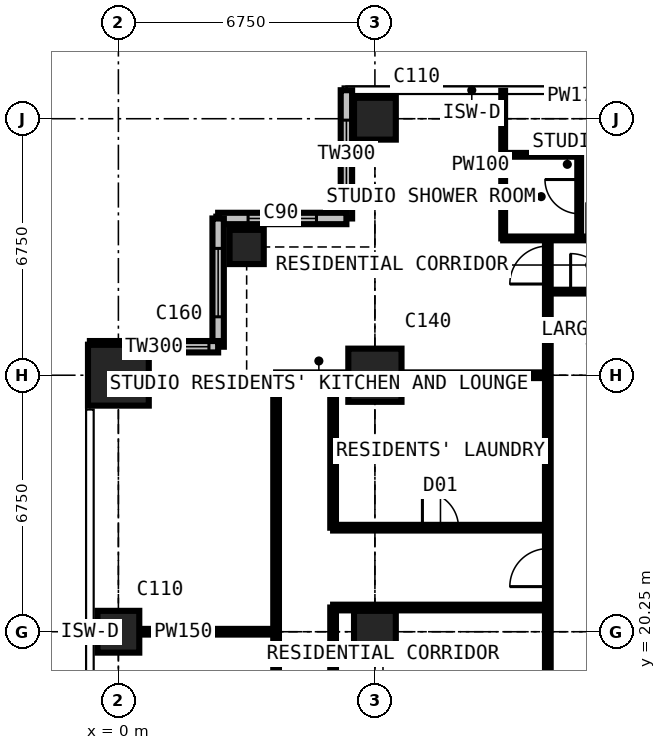
"""IFC4 building model, lengths in metres.
Left out: names, types, materials, properties, quantities, classifications, styles, units other than length and angle.
Written with IfcOpenShell. Run it as: python <this file> out.ifc"""

import sys

from ifc_helpers import new_model, si_unit, direction, frame, frame_2d, origin, origin_2d, place, context, subcontext, project, spatial, rectangle, extrude, element, fill, save


model = new_model("IFC4")
c1 = context("Model", 3, precision=1e-05, world=origin(), true_north=direction((0.0, 1.0)))
c2 = subcontext(c1, "Body", "Model", "MODEL_VIEW")
j1 = project(units=[si_unit("LENGTHUNIT", "METRE"), si_unit("PLANEANGLEUNIT", "RADIAN")], contexts=[c1])
p1 = place(None, origin())
s1 = spatial("IfcSite", under=j1, at=p1, CompositionType="ELEMENT")
p2 = place(p1, origin())
s2 = spatial("IfcBuilding", under=s1, at=p2, CompositionType="ELEMENT")
p3 = place(p2, frame((0.0, 0.0, 204.3)))
s3 = spatial("IfcBuildingStorey", under=s2, at=p3, CompositionType="ELEMENT", Elevation=204.3)
p4 = place(p3, frame((0.0, 20.25, 0.0), z_axis=(0.0, 0.0, 1.0), x_axis=(1.0, 0.0, 0.0)))
e1 = element("IfcColumn", 1, at=p4, inside=s3, PredefinedType="COLUMN", context=c2, shape_type="SweptSolid", body=[
    extrude(rectangle(XDim=1.1, YDim=1.1, at=origin_2d()), origin(), (0.0, 0.0, 1.0), 3.6),
])
p5 = place(p3, frame((0.0, 27.0, 0.0), z_axis=(0.0, 0.0, 1.0), x_axis=(1.0, 0.0, 0.0)))
e2 = element("IfcColumn", 2, at=p5, inside=s3, PredefinedType="COLUMN", context=c2, shape_type="SweptSolid", body=[
    extrude(rectangle(XDim=1.6, YDim=1.6, at=origin_2d()), origin(), (0.0, 0.0, 1.0), 3.6),
])
p6 = place(p3, frame((3.375, 30.375, 0.0), z_axis=(0.0, 0.0, 1.0), x_axis=(1.0, 0.0, 0.0)))
e3 = element("IfcColumn", 3, at=p6, inside=s3, PredefinedType="COLUMN", context=c2, shape_type="SweptSolid", body=[
    extrude(rectangle(XDim=0.9, YDim=0.9, at=origin_2d()), origin(), (0.0, 0.0, 1.0), 3.6),
])
p7 = place(p3, frame((6.75, 20.25, 0.0), z_axis=(0.0, 0.0, 1.0), x_axis=(1.0, 0.0, 0.0)))
e4 = element("IfcColumn", 4, at=p7, inside=s3, PredefinedType="COLUMN", context=c2, shape_type="SweptSolid", body=[
    extrude(rectangle(XDim=1.1, YDim=1.1, at=origin_2d()), origin(), (0.0, 0.0, 1.0), 3.6),
])
p8 = place(p3, frame((6.75, 27.0, 0.0), z_axis=(0.0, 0.0, 1.0), x_axis=(1.0, 0.0, 0.0)))
e5 = element("IfcColumn", 5, at=p8, inside=s3, PredefinedType="COLUMN", context=c2, shape_type="SweptSolid", body=[
    extrude(rectangle(XDim=1.4, YDim=1.4, at=origin_2d()), origin(), (0.0, 0.0, 1.0), 3.6),
])
p9 = place(p3, frame((6.75, 33.75, 0.0), z_axis=(0.0, 0.0, 1.0), x_axis=(1.0, 0.0, 0.0)))
e6 = element("IfcColumn", 6, at=p9, inside=s3, PredefinedType="COLUMN", context=c2, shape_type="SweptSolid", body=[
    extrude(rectangle(XDim=1.1, YDim=1.1, at=origin_2d()), origin(), (0.0, 0.0, 1.0), 3.6),
])
p10 = place(p3, frame((6.0, 34.5, 0.0), z_axis=(0.0, 0.0, 1.0), x_axis=(0.0, -1.0, 0.0)))
e7 = element("IfcWall", 7, at=p10, inside=s3, PredefinedType="SOLIDWALL", context=c2, shape_type="SweptSolid", body=[
    extrude(rectangle(XDim=3.375, YDim=0.3, at=frame_2d((1.688, 0.0))), origin(), (0.0, 0.0, 1.0), 3.375),
])
p11 = place(p10, frame((0.788, 0.0, 0.6)))
e8 = element("IfcOpeningElement", 8, at=p11, cuts=e7, PredefinedType="OPENING", context=c2, shape_type="SweptSolid", body=[
    extrude(rectangle(XDim=1.8, YDim=2.1, at=frame_2d((0.9, 1.05))), frame((0.0, 0.16, 0.0), z_axis=(0.0, -1.0, 0.0), x_axis=(1.0, 0.0, 0.0)), (0.0, 0.0, 1.0), 0.32),
])
p12 = place(p3, frame((6.0, 31.125, 0.0), z_axis=(0.0, 0.0, 1.0), x_axis=(-1.0, 0.0, 0.0)))
e9 = element("IfcWall", 9, at=p12, inside=s3, PredefinedType="SOLIDWALL", context=c2, shape_type="SweptSolid", body=[
    extrude(rectangle(XDim=3.375, YDim=0.3, at=frame_2d((1.688, 0.0))), origin(), (0.0, 0.0, 1.0), 3.375),
])
p13 = place(p12, frame((0.788, 0.0, 0.6)))
e10 = element("IfcOpeningElement", 10, at=p13, cuts=e9, PredefinedType="OPENING", context=c2, shape_type="SweptSolid", body=[
    extrude(rectangle(XDim=1.8, YDim=2.1, at=frame_2d((0.9, 1.05))), frame((0.0, 0.16, 0.0), z_axis=(0.0, -1.0, 0.0), x_axis=(1.0, 0.0, 0.0)), (0.0, 0.0, 1.0), 0.32),
])
p14 = place(p3, frame((2.625, 31.125, 0.0), z_axis=(0.0, 0.0, 1.0), x_axis=(0.0, -1.0, 0.0)))
e11 = element("IfcWall", 11, at=p14, inside=s3, PredefinedType="SOLIDWALL", context=c2, shape_type="SweptSolid", body=[
    extrude(rectangle(XDim=3.375, YDim=0.3, at=frame_2d((1.688, 0.0))), origin(), (0.0, 0.0, 1.0), 3.375),
])
p15 = place(p14, frame((0.788, 0.0, 0.6)))
e12 = element("IfcOpeningElement", 12, at=p15, cuts=e11, PredefinedType="OPENING", context=c2, shape_type="SweptSolid", body=[
    extrude(rectangle(XDim=1.8, YDim=2.1, at=frame_2d((0.9, 1.05))), frame((0.0, 0.16, 0.0), z_axis=(0.0, -1.0, 0.0), x_axis=(1.0, 0.0, 0.0)), (0.0, 0.0, 1.0), 0.32),
])
p16 = place(p3, frame((2.625, 27.75, 0.0), z_axis=(0.0, 0.0, 1.0), x_axis=(-1.0, 0.0, 0.0)))
e13 = element("IfcWall", 13, at=p16, inside=s3, PredefinedType="SOLIDWALL", context=c2, shape_type="SweptSolid", body=[
    extrude(rectangle(XDim=3.375, YDim=0.3, at=frame_2d((1.688, 0.0))), origin(), (0.0, 0.0, 1.0), 3.375),
])
p17 = place(p16, frame((0.242, 0.0, 0.9)))
e14 = element("IfcOpeningElement", 14, at=p17, cuts=e13, PredefinedType="OPENING", context=c2, shape_type="SweptSolid", body=[
    extrude(rectangle(XDim=1.5, YDim=1.8, at=frame_2d((0.75, 0.9))), frame((0.0, 0.16, 0.0), z_axis=(0.0, -1.0, 0.0), x_axis=(1.0, 0.0, 0.0)), (0.0, 0.0, 1.0), 0.32),
])
p18 = place(p3, frame((-0.734, 20.25, 0.0), z_axis=(0.0, 0.0, 1.0), x_axis=(1.0, 0.0, 0.0)))
e15 = element("IfcWall", 15, at=p18, inside=s3, PredefinedType="PARTITIONING", context=c2, shape_type="SweptSolid", body=[
    extrude(rectangle(XDim=4.884, YDim=0.15, at=frame_2d((2.442, 0.0))), origin(), (0.0, 0.0, 1.0), 2.877),
])
p19 = place(p3, frame((4.15, 13.5, 0.0), z_axis=(0.0, 0.0, 1.0), x_axis=(0.0, 1.0, 0.0)))
e16 = element("IfcWall", 16, at=p19, inside=s3, PredefinedType="PARTITIONING", context=c2, shape_type="SweptSolid", body=[
    extrude(rectangle(XDim=13.5, YDim=0.15, at=frame_2d((6.75, 0.0))), origin(), (0.0, 0.0, 1.0), 3.375),
])
p20 = place(p19, frame((4.2, 0.0, 0.0)))
e17 = element("IfcOpeningElement", 17, at=p20, cuts=e16, PredefinedType="OPENING", context=c2, shape_type="SweptSolid", body=[
    extrude(rectangle(XDim=0.95, YDim=2.2, at=frame_2d((0.475, 1.1))), frame((0.0, 0.085, 0.0), z_axis=(0.0, -1.0, 0.0), x_axis=(1.0, 0.0, 0.0)), (0.0, 0.0, 1.0), 0.17),
])
p21 = place(p3, frame((4.15, 27.0, 0.0), z_axis=(0.0, 0.0, 1.0), x_axis=(1.0, 0.0, 0.0)))
e18 = element("IfcWall", 18, at=p21, inside=s3, PredefinedType="PARTITIONING", context=c2, shape_type="SweptSolid", body=[
    extrude(rectangle(XDim=7.15, YDim=0.15, at=frame_2d((3.575, 0.0))), origin(), (0.0, 0.0, 1.0), 2.806),
])
p22 = place(p3, frame((5.65, 10.125, 0.0), z_axis=(0.0, 0.0, 1.0), x_axis=(0.0, 1.0, 0.0)))
e19 = element("IfcWall", 19, at=p22, inside=s3, PredefinedType="PARTITIONING", context=c2, shape_type="SweptSolid", body=[
    extrude(rectangle(XDim=10.762, YDim=0.15, at=frame_2d((5.381, 0.0))), origin(), (0.0, 0.0, 1.0), 3.375),
])
p23 = place(p22, frame((4.9, 0.0, 0.0)))
e20 = element("IfcOpeningElement", 20, at=p23, cuts=e19, PredefinedType="OPENING", context=c2, shape_type="SweptSolid", body=[
    extrude(rectangle(XDim=0.95, YDim=2.2, at=frame_2d((0.475, 1.1))), frame((0.0, 0.085, 0.0), z_axis=(0.0, -1.0, 0.0), x_axis=(1.0, 0.0, 0.0)), (0.0, 0.0, 1.0), 0.17),
])
p24 = place(p3, frame((5.65, 20.887, 0.0), z_axis=(0.0, 0.0, 1.0), x_axis=(1.0, 0.0, 0.0)))
e21 = element("IfcWall", 21, at=p24, inside=s3, PredefinedType="PARTITIONING", context=c2, shape_type="SweptSolid", body=[
    extrude(rectangle(XDim=5.65, YDim=0.15, at=frame_2d((2.825, 0.0))), origin(), (0.0, 0.0, 1.0), 3.375),
])
p25 = place(p3, frame((5.65, 22.988, 0.0), z_axis=(0.0, 0.0, 1.0), x_axis=(0.0, 1.0, 0.0)))
e22 = element("IfcWall", 22, at=p25, inside=s3, PredefinedType="PARTITIONING", context=c2, shape_type="SweptSolid", body=[
    extrude(rectangle(XDim=4.012, YDim=0.15, at=frame_2d((2.006, 0.0))), origin(), (0.0, 0.0, 1.0), 3.375),
])
p26 = place(p3, frame((5.65, 22.988, 0.0), z_axis=(0.0, 0.0, 1.0), x_axis=(1.0, 0.0, 0.0)))
e23 = element("IfcWall", 23, at=p26, inside=s3, PredefinedType="PARTITIONING", context=c2, shape_type="SweptSolid", body=[
    extrude(rectangle(XDim=5.65, YDim=0.15, at=frame_2d((2.825, 0.0))), origin(), (0.0, 0.0, 1.0), 3.375),
])
p27 = place(p26, frame((2.35, 0.0, 0.0)))
e24 = element("IfcOpeningElement", 24, at=p27, cuts=e23, PredefinedType="OPENING", context=c2, shape_type="SweptSolid", body=[
    extrude(rectangle(XDim=0.95, YDim=2.2, at=frame_2d((0.475, 1.1))), frame((0.0, 0.085, 0.0), z_axis=(0.0, -1.0, 0.0), x_axis=(1.0, 0.0, 0.0)), (0.0, 0.0, 1.0), 0.17),
])
p28 = place(p3, frame((10.125, 30.6, 0.0), z_axis=(0.0, 0.0, 1.0), x_axis=(0.0, 1.0, 0.0)))
e25 = element("IfcWall", 25, at=p28, inside=s3, PredefinedType="PARTITIONING", context=c2, shape_type="SweptSolid", body=[
    extrude(rectangle(XDim=3.884, YDim=0.1, at=frame_2d((1.942, 0.0))), origin(), (0.0, 0.0, 1.0), 3.375),
])
p29 = place(p3, frame((10.125, 30.6, 0.0), z_axis=(0.0, 0.0, 1.0), x_axis=(1.0, 0.0, 0.0)))
e26 = element("IfcWall", 26, at=p29, inside=s3, PredefinedType="PARTITIONING", context=c2, shape_type="SweptSolid", body=[
    extrude(rectangle(XDim=3.375, YDim=0.1, at=frame_2d((1.688, 0.0))), origin(), (0.0, 0.0, 1.0), 3.375),
])
p30 = place(p29, frame((2.2, 0.0, 0.0)))
e27 = element("IfcOpeningElement", 27, at=p30, cuts=e26, PredefinedType="OPENING", context=c2, shape_type="SweptSolid", body=[
    extrude(rectangle(XDim=0.95, YDim=2.2, at=frame_2d((0.475, 1.1))), frame((0.0, 0.06, 0.0), z_axis=(0.0, -1.0, 0.0), x_axis=(1.0, 0.0, 0.0)), (0.0, 0.0, 1.0), 0.12),
])
p31 = place(p3, frame((10.125, 32.8, 0.0), z_axis=(0.0, 0.0, 1.0), x_axis=(1.0, 0.0, 0.0)))
e28 = element("IfcWall", 28, at=p31, inside=s3, PredefinedType="PARTITIONING", context=c2, shape_type="SweptSolid", body=[
    extrude(rectangle(XDim=2.0, YDim=0.1, at=frame_2d((1.0, 0.0))), origin(), (0.0, 0.0, 1.0), 3.375),
])
p32 = place(p3, frame((11.3, 11.3, 0.0), z_axis=(0.0, 0.0, 1.0), x_axis=(0.0, 1.0, 0.0)))
e29 = element("IfcWall", 29, at=p32, inside=s3, PredefinedType="PARTITIONING", context=c2, shape_type="SweptSolid", body=[
    extrude(rectangle(XDim=19.3, YDim=0.15, at=frame_2d((9.65, 0.0))), origin(), (0.0, 0.0, 1.0), 3.375),
])
p33 = place(p32, frame((18.1, 0.0, 0.0)))
e30 = element("IfcOpeningElement", 30, at=p33, cuts=e29, PredefinedType="OPENING", context=c2, shape_type="SweptSolid", body=[
    extrude(rectangle(XDim=1.0, YDim=2.2, at=frame_2d((0.5, 1.1))), frame((0.0, 0.085, 0.0), z_axis=(0.0, -1.0, 0.0), x_axis=(1.0, 0.0, 0.0)), (0.0, 0.0, 1.0), 0.17),
])
p34 = place(p32, frame((10.137, 0.0, 0.0)))
e31 = element("IfcOpeningElement", 31, at=p34, cuts=e29, PredefinedType="OPENING", context=c2, shape_type="SweptSolid", body=[
    extrude(rectangle(XDim=1.0, YDim=2.2, at=frame_2d((0.5, 1.1))), frame((0.0, 0.085, 0.0), z_axis=(0.0, -1.0, 0.0), x_axis=(1.0, 0.0, 0.0)), (0.0, 0.0, 1.0), 0.17),
])
p35 = place(p3, frame((11.3, 29.2, 0.0), z_axis=(0.0, 0.0, 1.0), x_axis=(1.0, 0.0, 0.0)))
e32 = element("IfcWall", 32, at=p35, inside=s3, PredefinedType="PARTITIONING", context=c2, shape_type="SweptSolid", body=[
    extrude(rectangle(XDim=19.809, YDim=0.1, at=frame_2d((9.904, 0.0))), origin(), (0.0, 0.0, 1.0), 3.375),
])
p36 = place(p35, frame((16.3, 0.0, 0.0)))
e33 = element("IfcOpeningElement", 33, at=p36, cuts=e32, PredefinedType="OPENING", context=c2, shape_type="SweptSolid", body=[
    extrude(rectangle(XDim=1.0, YDim=2.2, at=frame_2d((0.5, 1.1))), frame((0.0, 0.06, 0.0), z_axis=(0.0, -1.0, 0.0), x_axis=(1.0, 0.0, 0.0)), (0.0, 0.0, 1.0), 0.12),
])
p37 = place(p35, frame((6.4, 0.0, 0.0)))
e34 = element("IfcOpeningElement", 34, at=p37, cuts=e32, PredefinedType="OPENING", context=c2, shape_type="SweptSolid", body=[
    extrude(rectangle(XDim=0.95, YDim=2.2, at=frame_2d((0.475, 1.1))), frame((0.0, 0.06, 0.0), z_axis=(0.0, -1.0, 0.0), x_axis=(1.0, 0.0, 0.0)), (0.0, 0.0, 1.0), 0.12),
])
p38 = place(p35, frame((13.15, 0.0, 0.0)))
e35 = element("IfcOpeningElement", 35, at=p38, cuts=e32, PredefinedType="OPENING", context=c2, shape_type="SweptSolid", body=[
    extrude(rectangle(XDim=0.95, YDim=2.2, at=frame_2d((0.475, 1.1))), frame((0.0, 0.06, 0.0), z_axis=(0.0, -1.0, 0.0), x_axis=(1.0, 0.0, 0.0)), (0.0, 0.0, 1.0), 0.12),
])
p39 = place(p35, frame((0.6, 0.0, 0.0)))
e36 = element("IfcOpeningElement", 36, at=p39, cuts=e32, PredefinedType="OPENING", context=c2, shape_type="SweptSolid", body=[
    extrude(rectangle(XDim=1.0, YDim=2.2, at=frame_2d((0.5, 1.1))), frame((0.0, 0.06, 0.0), z_axis=(0.0, -1.0, 0.0), x_axis=(1.0, 0.0, 0.0)), (0.0, 0.0, 1.0), 0.12),
])
p40 = place(p3, frame((12.125, 30.6, 0.0), z_axis=(0.0, 0.0, 1.0), x_axis=(0.0, 1.0, 0.0)))
e37 = element("IfcWall", 37, at=p40, inside=s3, PredefinedType="PARTITIONING", context=c2, shape_type="SweptSolid", body=[
    extrude(rectangle(XDim=2.2, YDim=0.1, at=frame_2d((1.1, 0.0))), origin(), (0.0, 0.0, 1.0), 3.375),
])
p41 = place(p40, frame((0.65, 0.0, 0.0)))
e38 = element("IfcOpeningElement", 38, at=p41, cuts=e37, PredefinedType="OPENING", context=c2, shape_type="SweptSolid", body=[
    extrude(rectangle(XDim=0.9, YDim=2.2, at=frame_2d((0.45, 1.1))), frame((0.0, 0.06, 0.0), z_axis=(0.0, -1.0, 0.0), x_axis=(1.0, 0.0, 0.0)), (0.0, 0.0, 1.0), 0.12),
])
p42 = place(p11, origin())
e39 = element("IfcWindow", 39, at=p42, inside=s3, PartitioningType="SINGLE_PANEL", PredefinedType="WINDOW", context=c2, shape_type="SweptSolid", body=[
    extrude(rectangle(XDim=1.8, YDim=2.1, at=frame_2d((0.9, 1.05))), frame((0.0, 0.03, 0.0), z_axis=(0.0, -1.0, 0.0), x_axis=(1.0, 0.0, 0.0)), (0.0, 0.0, 1.0), 0.06),
])
fill(e8, e39)
p43 = place(p13, origin())
e40 = element("IfcWindow", 40, at=p43, inside=s3, PartitioningType="SINGLE_PANEL", PredefinedType="WINDOW", context=c2, shape_type="SweptSolid", body=[
    extrude(rectangle(XDim=1.8, YDim=2.1, at=frame_2d((0.9, 1.05))), frame((0.0, 0.03, 0.0), z_axis=(0.0, -1.0, 0.0), x_axis=(1.0, 0.0, 0.0)), (0.0, 0.0, 1.0), 0.06),
])
fill(e10, e40)
p44 = place(p15, origin())
e41 = element("IfcWindow", 41, at=p44, inside=s3, PartitioningType="SINGLE_PANEL", PredefinedType="WINDOW", context=c2, shape_type="SweptSolid", body=[
    extrude(rectangle(XDim=1.8, YDim=2.1, at=frame_2d((0.9, 1.05))), frame((0.0, 0.03, 0.0), z_axis=(0.0, -1.0, 0.0), x_axis=(1.0, 0.0, 0.0)), (0.0, 0.0, 1.0), 0.06),
])
fill(e12, e41)
p45 = place(p17, origin())
e42 = element("IfcWindow", 42, at=p45, inside=s3, PartitioningType="SINGLE_PANEL", PredefinedType="WINDOW", context=c2, shape_type="SweptSolid", body=[
    extrude(rectangle(XDim=1.5, YDim=1.8, at=frame_2d((0.75, 0.9))), frame((0.0, 0.03, 0.0), z_axis=(0.0, -1.0, 0.0), x_axis=(1.0, 0.0, 0.0)), (0.0, 0.0, 1.0), 0.06),
])
fill(e14, e42)
p46 = place(p41, origin())
e43 = element("IfcDoor", 43, at=p46, inside=s3, OperationType="SINGLE_SWING_RIGHT", PredefinedType="DOOR", context=c2, shape_type="SweptSolid", body=[
    extrude(rectangle(XDim=0.9, YDim=2.2, at=frame_2d((0.45, 1.1))), frame((0.0, 0.025, 0.0), z_axis=(0.0, -1.0, 0.0), x_axis=(1.0, 0.0, 0.0)), (0.0, 0.0, 1.0), 0.05),
])
fill(e38, e43)
p47 = place(p39, origin())
e44 = element("IfcDoor", 44, at=p47, inside=s3, OperationType="SINGLE_SWING_LEFT", PredefinedType="DOOR", context=c2, shape_type="SweptSolid", body=[
    extrude(rectangle(XDim=1.0, YDim=2.2, at=frame_2d((0.5, 1.1))), frame((0.0, 0.025, 0.0), z_axis=(0.0, -1.0, 0.0), x_axis=(1.0, 0.0, 0.0)), (0.0, 0.0, 1.0), 0.05),
])
fill(e36, e44)
p48 = place(p33, origin())
e45 = element("IfcDoor", 45, at=p48, inside=s3, OperationType="SINGLE_SWING_LEFT", PredefinedType="DOOR", context=c2, shape_type="SweptSolid", body=[
    extrude(rectangle(XDim=1.0, YDim=2.2, at=frame_2d((0.5, 1.1))), frame((0.0, 0.025, 0.0), z_axis=(0.0, -1.0, 0.0), x_axis=(1.0, 0.0, 0.0)), (0.0, 0.0, 1.0), 0.05),
])
fill(e30, e45)
p49 = place(p34, origin())
e46 = element("IfcDoor", 46, at=p49, inside=s3, OperationType="SINGLE_SWING_LEFT", PredefinedType="DOOR", context=c2, shape_type="SweptSolid", body=[
    extrude(rectangle(XDim=1.0, YDim=2.2, at=frame_2d((0.5, 1.1))), frame((0.0, 0.025, 0.0), z_axis=(0.0, -1.0, 0.0), x_axis=(1.0, 0.0, 0.0)), (0.0, 0.0, 1.0), 0.05),
])
fill(e31, e46)
p50 = place(p27, origin())
e47 = element("IfcDoor", 47, at=p50, inside=s3, OperationType="SINGLE_SWING_LEFT", PredefinedType="DOOR", context=c2, shape_type="SweptSolid", body=[
    extrude(rectangle(XDim=0.95, YDim=2.2, at=frame_2d((0.475, 1.1))), frame((0.0, 0.025, 0.0), z_axis=(0.0, -1.0, 0.0), x_axis=(1.0, 0.0, 0.0)), (0.0, 0.0, 1.0), 0.05),
])
fill(e24, e47)
save(model, sys.argv[1])
